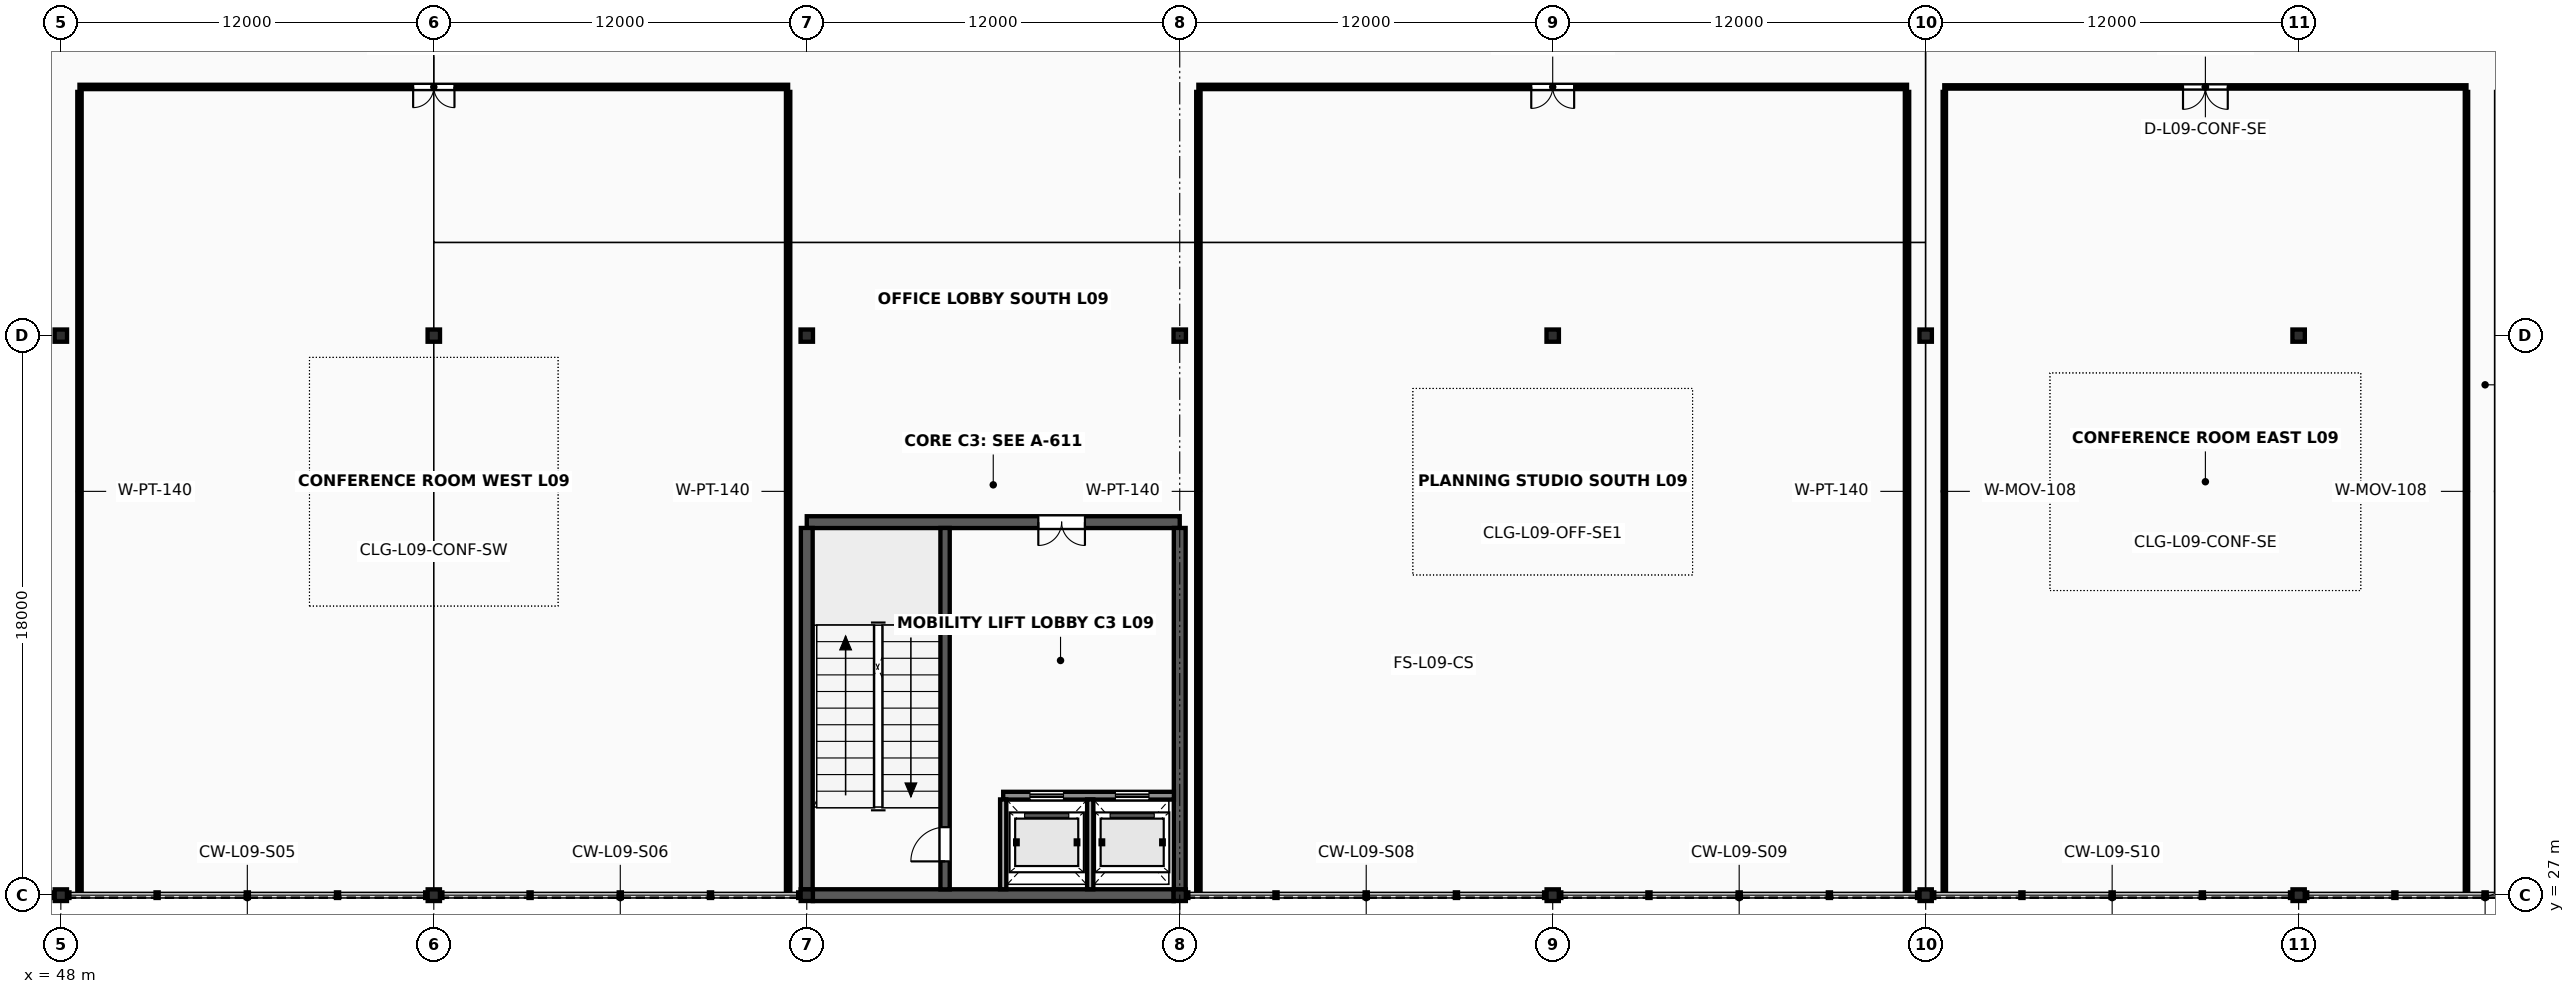
"""IFC4 building model, lengths in metres.
Left out: names, types, materials, properties, quantities, classifications, styles, units other than length and angle.
Written with IfcOpenShell. Run it as: python <this file> out.ifc"""

import sys

from ifc_helpers import new_model, si_unit, direction, frame, frame_2d, origin, origin_2d, place, context, subcontext, project, spatial, rectangle, i_section, extrude, element, fill, save


model = new_model("IFC4")
c1 = context("Model", 3, precision=1e-05, world=origin(), true_north=direction((0.0, 1.0)))
c2 = subcontext(c1, "Body", "Model", "MODEL_VIEW")
j1 = project(units=[si_unit("LENGTHUNIT", "METRE"), si_unit("PLANEANGLEUNIT", "RADIAN")], contexts=[c1])
p1 = place(None, origin())
s1 = spatial("IfcSite", under=j1, at=p1, CompositionType="ELEMENT")
p2 = place(p1, origin())
s2 = spatial("IfcBuilding", under=s1, at=p2, CompositionType="ELEMENT")
p3 = place(p2, frame((0.0, 0.0, 37.6)))
s3 = spatial("IfcBuildingStorey", under=s2, at=p3, CompositionType="ELEMENT", Elevation=37.6)
p4 = place(p3, frame((48.0, 27.0, 0.0), z_axis=(0.0, 0.0, 1.0), x_axis=(1.0, 0.0, 0.0)))
e1 = element("IfcColumn", 1, at=p4, inside=s3, PredefinedType="COLUMN", context=c2, shape_type="SweptSolid", body=[
    extrude(i_section(OverallWidth=0.394, OverallDepth=0.375, WebThickness=0.017, FlangeThickness=0.028, FilletRadius=0.018, at=origin_2d()), origin(), (0.0, 0.0, 1.0), 4.0),
])
p5 = place(p3, frame((48.0, 45.0, 0.0), z_axis=(0.0, 0.0, 1.0), x_axis=(1.0, 0.0, 0.0)))
e2 = element("IfcColumn", 2, at=p5, inside=s3, PredefinedType="COLUMN", context=c2, shape_type="SweptSolid", body=[
    extrude(i_section(OverallWidth=0.399, OverallDepth=0.393, WebThickness=0.023, FlangeThickness=0.037, FilletRadius=0.018, at=origin_2d()), origin(), (0.0, 0.0, 1.0), 4.0),
])
p6 = place(p3, frame((60.0, 27.0, 0.0), z_axis=(0.0, 0.0, 1.0), x_axis=(1.0, 0.0, 0.0)))
e3 = element("IfcColumn", 3, at=p6, inside=s3, PredefinedType="COLUMN", context=c2, shape_type="SweptSolid", body=[
    extrude(i_section(OverallWidth=0.394, OverallDepth=0.375, WebThickness=0.017, FlangeThickness=0.028, FilletRadius=0.018, at=origin_2d()), origin(), (0.0, 0.0, 1.0), 4.0),
])
p7 = place(p3, frame((60.0, 45.0, 0.0), z_axis=(0.0, 0.0, 1.0), x_axis=(1.0, 0.0, 0.0)))
e4 = element("IfcColumn", 4, at=p7, inside=s3, PredefinedType="COLUMN", context=c2, shape_type="SweptSolid", body=[
    extrude(i_section(OverallWidth=0.399, OverallDepth=0.393, WebThickness=0.023, FlangeThickness=0.037, FilletRadius=0.018, at=origin_2d()), origin(), (0.0, 0.0, 1.0), 4.0),
])
p8 = place(p3, frame((72.0, 27.0, 0.0), z_axis=(0.0, 0.0, 1.0), x_axis=(1.0, 0.0, 0.0)))
e5 = element("IfcColumn", 5, at=p8, inside=s3, PredefinedType="COLUMN", context=c2, shape_type="SweptSolid", body=[
    extrude(i_section(OverallWidth=0.394, OverallDepth=0.375, WebThickness=0.017, FlangeThickness=0.028, FilletRadius=0.018, at=origin_2d()), origin(), (0.0, 0.0, 1.0), 4.0),
])
p9 = place(p3, frame((72.0, 45.0, 0.0), z_axis=(0.0, 0.0, 1.0), x_axis=(1.0, 0.0, 0.0)))
e6 = element("IfcColumn", 6, at=p9, inside=s3, PredefinedType="COLUMN", context=c2, shape_type="SweptSolid", body=[
    extrude(i_section(OverallWidth=0.399, OverallDepth=0.393, WebThickness=0.023, FlangeThickness=0.037, FilletRadius=0.018, at=origin_2d()), origin(), (0.0, 0.0, 1.0), 4.0),
])
p10 = place(p3, frame((84.0, 27.0, 0.0), z_axis=(0.0, 0.0, 1.0), x_axis=(1.0, 0.0, 0.0)))
e7 = element("IfcColumn", 7, at=p10, inside=s3, PredefinedType="COLUMN", context=c2, shape_type="SweptSolid", body=[
    extrude(i_section(OverallWidth=0.394, OverallDepth=0.375, WebThickness=0.017, FlangeThickness=0.028, FilletRadius=0.018, at=origin_2d()), origin(), (0.0, 0.0, 1.0), 4.0),
])
p11 = place(p3, frame((84.0, 45.0, 0.0), z_axis=(0.0, 0.0, 1.0), x_axis=(1.0, 0.0, 0.0)))
e8 = element("IfcColumn", 8, at=p11, inside=s3, PredefinedType="COLUMN", context=c2, shape_type="SweptSolid", body=[
    extrude(i_section(OverallWidth=0.399, OverallDepth=0.393, WebThickness=0.023, FlangeThickness=0.037, FilletRadius=0.018, at=origin_2d()), origin(), (0.0, 0.0, 1.0), 4.0),
])
p12 = place(p3, frame((96.0, 27.0, 0.0), z_axis=(0.0, 0.0, 1.0), x_axis=(1.0, 0.0, 0.0)))
e9 = element("IfcColumn", 9, at=p12, inside=s3, PredefinedType="COLUMN", context=c2, shape_type="SweptSolid", body=[
    extrude(i_section(OverallWidth=0.394, OverallDepth=0.375, WebThickness=0.017, FlangeThickness=0.028, FilletRadius=0.018, at=origin_2d()), origin(), (0.0, 0.0, 1.0), 4.0),
])
p13 = place(p3, frame((96.0, 45.0, 0.0), z_axis=(0.0, 0.0, 1.0), x_axis=(1.0, 0.0, 0.0)))
e10 = element("IfcColumn", 10, at=p13, inside=s3, PredefinedType="COLUMN", context=c2, shape_type="SweptSolid", body=[
    extrude(i_section(OverallWidth=0.399, OverallDepth=0.393, WebThickness=0.023, FlangeThickness=0.037, FilletRadius=0.018, at=origin_2d()), origin(), (0.0, 0.0, 1.0), 4.0),
])
p14 = place(p3, frame((108.0, 27.0, 0.0), z_axis=(0.0, 0.0, 1.0), x_axis=(1.0, 0.0, 0.0)))
e11 = element("IfcColumn", 11, at=p14, inside=s3, PredefinedType="COLUMN", context=c2, shape_type="SweptSolid", body=[
    extrude(i_section(OverallWidth=0.394, OverallDepth=0.375, WebThickness=0.017, FlangeThickness=0.028, FilletRadius=0.018, at=origin_2d()), origin(), (0.0, 0.0, 1.0), 4.0),
])
p15 = place(p3, frame((108.0, 45.0, 0.0), z_axis=(0.0, 0.0, 1.0), x_axis=(1.0, 0.0, 0.0)))
e12 = element("IfcColumn", 12, at=p15, inside=s3, PredefinedType="COLUMN", context=c2, shape_type="SweptSolid", body=[
    extrude(i_section(OverallWidth=0.399, OverallDepth=0.393, WebThickness=0.023, FlangeThickness=0.037, FilletRadius=0.018, at=origin_2d()), origin(), (0.0, 0.0, 1.0), 4.0),
])
p16 = place(p3, frame((120.0, 27.0, 0.0), z_axis=(0.0, 0.0, 1.0), x_axis=(1.0, 0.0, 0.0)))
e13 = element("IfcColumn", 13, at=p16, inside=s3, PredefinedType="COLUMN", context=c2, shape_type="SweptSolid", body=[
    extrude(i_section(OverallWidth=0.394, OverallDepth=0.375, WebThickness=0.017, FlangeThickness=0.028, FilletRadius=0.018, at=origin_2d()), origin(), (0.0, 0.0, 1.0), 4.0),
])
p17 = place(p3, frame((120.0, 45.0, 0.0), z_axis=(0.0, 0.0, 1.0), x_axis=(1.0, 0.0, 0.0)))
e14 = element("IfcColumn", 14, at=p17, inside=s3, PredefinedType="COLUMN", context=c2, shape_type="SweptSolid", body=[
    extrude(i_section(OverallWidth=0.399, OverallDepth=0.393, WebThickness=0.023, FlangeThickness=0.037, FilletRadius=0.018, at=origin_2d()), origin(), (0.0, 0.0, 1.0), 4.0),
])
p18 = place(p3, frame((72.194, 27.0, 0.0), z_axis=(0.0, 0.0, 1.0), x_axis=(1.0, 0.0, 0.0)))
e15 = element("IfcWall", 15, at=p18, inside=s3, PredefinedType="SHEAR", context=c2, shape_type="SweptSolid", body=[
    extrude(rectangle(XDim=11.612, YDim=0.38, at=frame_2d((5.806, 0.0))), origin(), (0.0, 0.0, 1.0), 3.838),
])
p19 = place(p3, frame((72.0, 39.0, 0.0), z_axis=(0.0, 0.0, 1.0), x_axis=(1.0, 0.0, 0.0)))
e16 = element("IfcWall", 16, at=p19, inside=s3, PredefinedType="SHEAR", context=c2, shape_type="SweptSolid", body=[
    extrude(rectangle(XDim=12.0, YDim=0.38, at=frame_2d((6.0, 0.0))), origin(), (0.0, 0.0, 1.0), 3.838),
])
p20 = place(p19, frame((7.45, 0.0, 0.0)))
e17 = element("IfcOpeningElement", 17, at=p20, cuts=e16, PredefinedType="OPENING", context=c2, shape_type="SweptSolid", body=[
    extrude(rectangle(XDim=1.5, YDim=2.25, at=frame_2d((0.75, 1.125))), frame((0.0, 0.205, 0.0), z_axis=(0.0, -1.0, 0.0), x_axis=(1.0, 0.0, 0.0)), (0.0, 0.0, 1.0), 0.41),
])
for number, where, z_axis, x_axis in (
    (18, (72.0, 27.185, 0.0), (0.0, 0.0, 1.0), (0.0, 1.0, 0.0)),
    (19, (84.0, 27.185, 0.0), (0.0, 0.0, 1.0), (0.0, 1.0, 0.0)),
):
    element("IfcWall", number, at=place(p3, frame(where, z_axis=z_axis, x_axis=x_axis)), inside=s3, PredefinedType="SHEAR", context=c2, shape_type="SweptSolid", body=[
        extrude(rectangle(XDim=11.628, YDim=0.38, at=frame_2d((5.814, 0.0))), origin(), (0.0, 0.0, 1.0), 3.838),
    ])
p21 = place(p3, frame((76.45, 27.187, 0.0), z_axis=(0.0, 0.0, 1.0), x_axis=(0.0, 1.0, 0.0)))
e20 = element("IfcWall", 20, at=p21, inside=s3, PredefinedType="SHEAR", context=c2, shape_type="SweptSolid", body=[
    extrude(rectangle(XDim=11.626, YDim=0.3, at=frame_2d((5.813, 0.0))), origin(), (0.0, 0.0, 1.0), 3.838),
])
p22 = place(p21, frame((0.9, 0.0, 0.0)))
e21 = element("IfcOpeningElement", 21, at=p22, cuts=e20, PredefinedType="OPENING", context=c2, shape_type="SweptSolid", body=[
    extrude(rectangle(XDim=1.1, YDim=2.2, at=frame_2d((0.55, 1.1))), frame((0.0, 0.165, 0.0), z_axis=(0.0, -1.0, 0.0), x_axis=(1.0, 0.0, 0.0)), (0.0, 0.0, 1.0), 0.33),
])
p23 = place(p3, frame((78.32, 30.2, 0.0), z_axis=(0.0, 0.0, 1.0), x_axis=(1.0, 0.0, 0.0)))
e22 = element("IfcWall", 22, at=p23, inside=s3, PredefinedType="SOLIDWALL", context=c2, shape_type="SweptSolid", body=[
    extrude(rectangle(XDim=5.493, YDim=0.25, at=frame_2d((2.747, 0.0))), origin(), (0.0, 0.0, 1.0), 3.838),
])
p24 = place(p23, frame((0.86, 0.0, 0.0)))
e23 = element("IfcOpeningElement", 23, at=p24, cuts=e22, PredefinedType="OPENING", context=c2, shape_type="SweptSolid", body=[
    extrude(rectangle(XDim=1.08, YDim=2.22, at=frame_2d((0.54, 1.11))), frame((0.0, 0.14, 0.0), z_axis=(0.0, -1.0, 0.0), x_axis=(1.0, 0.0, 0.0)), (0.0, 0.0, 1.0), 0.28),
])
p25 = place(p23, frame((3.61, 0.0, 0.0)))
e24 = element("IfcOpeningElement", 24, at=p25, cuts=e22, PredefinedType="OPENING", context=c2, shape_type="SweptSolid", body=[
    extrude(rectangle(XDim=1.08, YDim=2.22, at=frame_2d((0.54, 1.11))), frame((0.0, 0.14, 0.0), z_axis=(0.0, -1.0, 0.0), x_axis=(1.0, 0.0, 0.0)), (0.0, 0.0, 1.0), 0.28),
])
for number, where, z_axis, x_axis in (
    (25, (78.32, 27.19, 0.0), (0.0, 0.0, 1.0), (0.0, 1.0, 0.0)),
    (26, (81.12, 27.19, 0.0), (0.0, 0.0, 1.0), (0.0, 1.0, 0.0)),
):
    element("IfcWall", number, at=place(p3, frame(where, z_axis=z_axis, x_axis=x_axis)), inside=s3, PredefinedType="SOLIDWALL", context=c2, shape_type="SweptSolid", body=[
        extrude(rectangle(XDim=2.89, YDim=0.2, at=frame_2d((1.445, 0.0))), origin(), (0.0, 0.0, 1.0), 3.828),
    ])
p26 = place(p3, frame((48.6, 53.0, 0.0), z_axis=(0.0, 0.0, 1.0), x_axis=(1.0, 0.0, 0.0)))
e27 = element("IfcWall", 27, at=p26, inside=s3, PredefinedType="PARTITIONING", context=c2, shape_type="SweptSolid", body=[
    extrude(rectangle(XDim=22.8, YDim=0.14, at=frame_2d((11.4, 0.0))), origin(), (0.0, 0.0, 1.0), 2.88),
])
p27 = place(p26, frame((10.735, 0.0, 0.0)))
e28 = element("IfcOpeningElement", 28, at=p27, cuts=e27, PredefinedType="OPENING", context=c2, shape_type="SweptSolid", body=[
    extrude(rectangle(XDim=1.33, YDim=2.2, at=frame_2d((0.665, 1.1))), frame((0.0, 0.085, 0.0), z_axis=(0.0, -1.0, 0.0), x_axis=(1.0, 0.0, 0.0)), (0.0, 0.0, 1.0), 0.17),
])
for number, where, z_axis, x_axis in (
    (29, (48.6, 27.14, 0.0), (0.0, 0.0, 1.0), (0.0, 1.0, 0.0)),
    (30, (71.4, 27.14, 0.0), (0.0, 0.0, 1.0), (0.0, 1.0, 0.0)),
):
    element("IfcWall", number, at=place(p3, frame(where, z_axis=z_axis, x_axis=x_axis)), inside=s3, PredefinedType="PARTITIONING", context=c2, shape_type="SweptSolid", body=[
        extrude(rectangle(XDim=25.7, YDim=0.14, at=frame_2d((12.85, 0.0))), origin(), (0.0, 0.0, 1.0), 2.88),
    ])
p28 = place(p3, frame((84.6, 53.0, 0.0), z_axis=(0.0, 0.0, 1.0), x_axis=(1.0, 0.0, 0.0)))
e31 = element("IfcWall", 31, at=p28, inside=s3, PredefinedType="PARTITIONING", context=c2, shape_type="SweptSolid", body=[
    extrude(rectangle(XDim=22.8, YDim=0.14, at=frame_2d((11.4, 0.0))), origin(), (0.0, 0.0, 1.0), 2.88),
])
p29 = place(p28, frame((10.71, 0.0, 0.0)))
e32 = element("IfcOpeningElement", 32, at=p29, cuts=e31, PredefinedType="OPENING", context=c2, shape_type="SweptSolid", body=[
    extrude(rectangle(XDim=1.38, YDim=2.23, at=frame_2d((0.69, 1.115))), frame((0.0, 0.085, 0.0), z_axis=(0.0, -1.0, 0.0), x_axis=(1.0, 0.0, 0.0)), (0.0, 0.0, 1.0), 0.17),
])
for number, where, z_axis, x_axis in (
    (33, (84.6, 27.14, 0.0), (0.0, 0.0, 1.0), (0.0, 1.0, 0.0)),
    (34, (107.4, 27.14, 0.0), (0.0, 0.0, 1.0), (0.0, 1.0, 0.0)),
):
    element("IfcWall", number, at=place(p3, frame(where, z_axis=z_axis, x_axis=x_axis)), inside=s3, PredefinedType="PARTITIONING", context=c2, shape_type="SweptSolid", body=[
        extrude(rectangle(XDim=25.7, YDim=0.14, at=frame_2d((12.85, 0.0))), origin(), (0.0, 0.0, 1.0), 2.88),
    ])
p30 = place(p3, frame((108.6, 53.0, 0.0), z_axis=(0.0, 0.0, 1.0), x_axis=(1.0, 0.0, 0.0)))
e35 = element("IfcWall", 35, at=p30, inside=s3, PredefinedType="MOVABLE", context=c2, shape_type="SweptSolid", body=[
    extrude(rectangle(XDim=16.8, YDim=0.108, at=frame_2d((8.4, 0.0))), origin(), (0.0, 0.0, 1.0), 2.88),
])
p31 = place(p30, frame((7.68, 0.0, 0.0)))
e36 = element("IfcOpeningElement", 36, at=p31, cuts=e35, PredefinedType="OPENING", context=c2, shape_type="SweptSolid", body=[
    extrude(rectangle(XDim=1.44, YDim=2.26, at=frame_2d((0.72, 1.13))), frame((0.0, 0.069, 0.0), z_axis=(0.0, -1.0, 0.0), x_axis=(1.0, 0.0, 0.0)), (0.0, 0.0, 1.0), 0.138),
])
for number, where, z_axis, x_axis in (
    (37, (108.6, 27.14, 0.0), (0.0, 0.0, 1.0), (0.0, 1.0, 0.0)),
    (38, (125.4, 27.14, 0.0), (0.0, 0.0, 1.0), (0.0, 1.0, 0.0)),
):
    element("IfcWall", number, at=place(p3, frame(where, z_axis=z_axis, x_axis=x_axis)), inside=s3, PredefinedType="MOVABLE", context=c2, shape_type="SweptSolid", body=[
        extrude(rectangle(XDim=25.7, YDim=0.108, at=frame_2d((12.85, 0.0))), origin(), (0.0, 0.0, 1.0), 2.88),
    ])
p32 = place(p22, origin())
e39 = element("IfcDoor", 39, at=p32, inside=s3, OperationType="SINGLE_SWING_LEFT", PredefinedType="DOOR", context=c2, shape_type="SweptSolid", body=[
    extrude(rectangle(XDim=1.1, YDim=2.2, at=frame_2d((0.55, 1.1))), frame((0.0, 0.025, 0.0), z_axis=(0.0, -1.0, 0.0), x_axis=(1.0, 0.0, 0.0)), (0.0, 0.0, 1.0), 0.05),
])
fill(e21, e39)
p33 = place(p20, origin())
e40 = element("IfcDoor", 40, at=p33, inside=s3, OperationType="DOUBLE_DOOR_SINGLE_SWING", PredefinedType="DOOR", context=c2, shape_type="SweptSolid", body=[
    extrude(rectangle(XDim=1.5, YDim=2.25, at=frame_2d((0.75, 1.125))), frame((0.0, 0.025, 0.0), z_axis=(0.0, -1.0, 0.0), x_axis=(1.0, 0.0, 0.0)), (0.0, 0.0, 1.0), 0.05),
])
fill(e17, e40)
p34 = place(p24, origin())
e41 = element("IfcDoor", 41, at=p34, inside=s3, OperationType="SLIDING_TO_LEFT", PredefinedType="USERDEFINED", context=c2, shape_type="SweptSolid", body=[
    extrude(rectangle(XDim=1.08, YDim=2.22, at=frame_2d((0.54, 1.11))), frame((0.0, 0.025, 0.0), z_axis=(0.0, -1.0, 0.0), x_axis=(1.0, 0.0, 0.0)), (0.0, 0.0, 1.0), 0.05),
])
fill(e23, e41)
p35 = place(p25, origin())
e42 = element("IfcDoor", 42, at=p35, inside=s3, OperationType="SLIDING_TO_LEFT", PredefinedType="USERDEFINED", context=c2, shape_type="SweptSolid", body=[
    extrude(rectangle(XDim=1.08, YDim=2.22, at=frame_2d((0.54, 1.11))), frame((0.0, 0.025, 0.0), z_axis=(0.0, -1.0, 0.0), x_axis=(1.0, 0.0, 0.0)), (0.0, 0.0, 1.0), 0.05),
])
fill(e24, e42)
p36 = place(p27, origin())
e43 = element("IfcDoor", 43, at=p36, inside=s3, OperationType="DOUBLE_DOOR_SINGLE_SWING", PredefinedType="DOOR", context=c2, shape_type="SweptSolid", body=[
    extrude(rectangle(XDim=1.33, YDim=2.2, at=frame_2d((0.665, 1.1))), frame((0.0, 0.025, 0.0), z_axis=(0.0, -1.0, 0.0), x_axis=(1.0, 0.0, 0.0)), (0.0, 0.0, 1.0), 0.05),
])
fill(e28, e43)
p37 = place(p29, origin())
e44 = element("IfcDoor", 44, at=p37, inside=s3, OperationType="DOUBLE_DOOR_SINGLE_SWING", PredefinedType="DOOR", context=c2, shape_type="SweptSolid", body=[
    extrude(rectangle(XDim=1.38, YDim=2.23, at=frame_2d((0.69, 1.115))), frame((0.0, 0.025, 0.0), z_axis=(0.0, -1.0, 0.0), x_axis=(1.0, 0.0, 0.0)), (0.0, 0.0, 1.0), 0.05),
])
fill(e32, e44)
p38 = place(p31, origin())
e45 = element("IfcDoor", 45, at=p38, inside=s3, OperationType="DOUBLE_DOOR_SINGLE_SWING", PredefinedType="DOOR", context=c2, shape_type="SweptSolid", body=[
    extrude(rectangle(XDim=1.44, YDim=2.26, at=frame_2d((0.72, 1.13))), frame((0.0, 0.025, 0.0), z_axis=(0.0, -1.0, 0.0), x_axis=(1.0, 0.0, 0.0)), (0.0, 0.0, 1.0), 0.05),
])
fill(e36, e45)
save(model, sys.argv[1])
